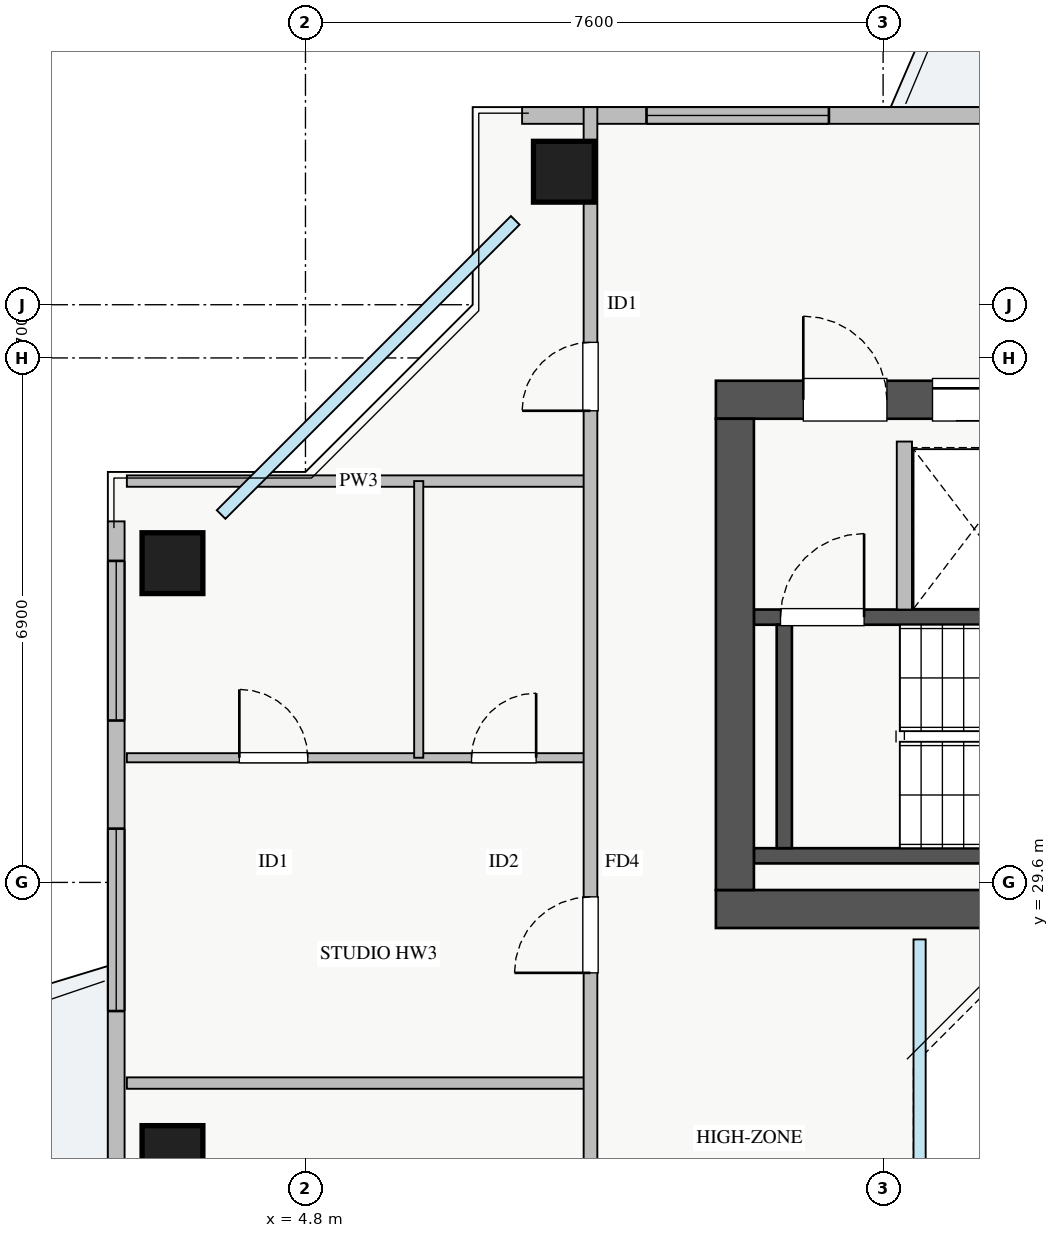
"""IFC4 building model, lengths in metres.
Left out: names, types, materials, properties, quantities, classifications, styles, units other than length and angle.
Written with IfcOpenShell. Run it as: python <this file> out.ifc"""

import sys

from ifc_helpers import new_model, si_unit, direction, frame, frame_2d, origin, origin_2d, place, context, subcontext, project, spatial, rectangle, extrude, source, transform, mapped, element, fill, save


model = new_model("IFC4")
c1 = context("Model", 3, precision=1e-05, world=origin(), true_north=direction((0.0, 1.0)))
c2 = subcontext(c1, "Body", "Model", "MODEL_VIEW")
j1 = project(units=[si_unit("LENGTHUNIT", "METRE"), si_unit("PLANEANGLEUNIT", "RADIAN")], contexts=[c1])
p1 = place(None, origin())
s1 = spatial("IfcSite", under=j1, at=p1, CompositionType="ELEMENT")
p2 = place(p1, origin())
s2 = spatial("IfcBuilding", under=s1, at=p2, CompositionType="ELEMENT")
p3 = place(p2, frame((0.0, 0.0, 206.75)))
s3 = spatial("IfcBuildingStorey", under=s2, at=p3, CompositionType="ELEMENT", Elevation=206.75)
p4 = place(p3, frame((12.68, 33.2, 0.0), z_axis=(0.0, 0.0, 1.0), x_axis=(1.0, 0.0, 0.0)))
e1 = element("IfcWall", 1, at=p4, inside=s3, PredefinedType="SHEAR", context=c2, shape_type="SweptSolid", body=[
    extrude(rectangle(XDim=1.94, YDim=0.18, at=frame_2d((0.97, 0.0))), origin(), (0.0, 0.0, 1.0), 3.07),
])
p5 = place(p3, frame((10.7, 29.95, 0.0), z_axis=(0.0, 0.0, 1.0), x_axis=(1.0, 0.0, 0.0)))
e2 = element("IfcWall", 2, at=p5, inside=s3, PredefinedType="SHEAR", context=c2, shape_type="SweptSolid", body=[
    extrude(rectangle(XDim=7.45, YDim=0.2, at=frame_2d((3.725, 0.0))), origin(), (0.0, 0.0, 1.0), 3.25),
])
p6 = place(p3, frame((10.7, 33.09, 0.0), z_axis=(0.0, 0.0, 1.0), x_axis=(1.0, 0.0, 0.0)))
e3 = element("IfcWall", 3, at=p6, inside=s3, PredefinedType="SHEAR", context=c2, shape_type="SweptSolid", body=[
    extrude(rectangle(XDim=7.45, YDim=0.2, at=frame_2d((3.725, 0.0))), origin(), (0.0, 0.0, 1.0), 3.25),
])
p7 = place(p6, frame((0.35, 0.0, 0.0)))
e4 = element("IfcOpeningElement", 4, at=p7, cuts=e3, PredefinedType="OPENING", context=c2, shape_type="SweptSolid", body=[
    extrude(rectangle(XDim=1.1, YDim=2.05, at=frame_2d((0.55, 1.025))), frame((0.0, 0.11, 0.0), z_axis=(0.0, -1.0, 0.0), x_axis=(1.0, 0.0, 0.0)), (0.0, 0.0, 1.0), 0.22),
])
p8 = place(p3, frame((11.1, 30.05, 0.0), z_axis=(0.0, 0.0, 1.0), x_axis=(0.0, 1.0, 0.0)))
e5 = element("IfcWall", 5, at=p8, inside=s3, PredefinedType="SHEAR", context=c2, shape_type="SweptSolid", body=[
    extrude(rectangle(XDim=2.94, YDim=0.2, at=frame_2d((1.47, 0.0))), origin(), (0.0, 0.0, 1.0), 3.25),
])
p9 = place(p3, frame((10.2, 29.25, 0.0), z_axis=(0.0, 0.0, 1.0), x_axis=(1.0, 0.0, 0.0)))
e6 = element("IfcWall", 6, at=p9, inside=s3, PredefinedType="SHEAR", context=c2, shape_type="SweptSolid", body=[
    extrude(rectangle(XDim=17.6, YDim=0.5, at=frame_2d((8.8, 0.0))), origin(), (0.0, 0.0, 1.0), 3.25),
])
p10 = place(p3, frame((10.2, 35.95, 0.0), z_axis=(0.0, 0.0, 1.0), x_axis=(1.0, 0.0, 0.0)))
e7 = element("IfcWall", 7, at=p10, inside=s3, PredefinedType="SHEAR", context=c2, shape_type="SweptSolid", body=[
    extrude(rectangle(XDim=17.6, YDim=0.5, at=frame_2d((8.8, 0.0))), origin(), (0.0, 0.0, 1.0), 3.25),
])
p11 = place(p10, frame((1.15, 0.0, 0.0)))
e8 = element("IfcOpeningElement", 8, at=p11, cuts=e7, PredefinedType="OPENING", context=c2, shape_type="SweptSolid", body=[
    extrude(rectangle(XDim=1.1, YDim=2.05, at=frame_2d((0.55, 1.025))), frame((0.0, 0.26, 0.0), z_axis=(0.0, -1.0, 0.0), x_axis=(1.0, 0.0, 0.0)), (0.0, 0.0, 1.0), 0.52),
])
p12 = place(p10, frame((8.3, 0.0, 0.0)))
e9 = element("IfcOpeningElement", 9, at=p12, cuts=e7, PredefinedType="OPENING", context=c2, shape_type="SweptSolid", body=[
    extrude(rectangle(XDim=1.1, YDim=2.05, at=frame_2d((0.55, 1.025))), frame((0.0, 0.26, 0.0), z_axis=(0.0, -1.0, 0.0), x_axis=(1.0, 0.0, 0.0)), (0.0, 0.0, 1.0), 0.52),
])
p13 = place(p10, frame((2.85, 0.0, 0.0)))
e10 = element("IfcOpeningElement", 10, at=p13, cuts=e7, PredefinedType="OPENING", context=c2, shape_type="SweptSolid", body=[
    extrude(rectangle(XDim=1.1, YDim=2.05, at=frame_2d((0.55, 1.025))), frame((0.0, 0.26, 0.0), z_axis=(0.0, -1.0, 0.0), x_axis=(1.0, 0.0, 0.0)), (0.0, 0.0, 1.0), 0.52),
])
p14 = place(p10, frame((5.8, 0.0, 0.0)))
e11 = element("IfcOpeningElement", 11, at=p14, cuts=e7, PredefinedType="OPENING", context=c2, shape_type="SweptSolid", body=[
    extrude(rectangle(XDim=1.0, YDim=2.05, at=frame_2d((0.5, 1.025))), frame((0.0, 0.26, 0.0), z_axis=(0.0, -1.0, 0.0), x_axis=(1.0, 0.0, 0.0)), (0.0, 0.0, 1.0), 0.52),
])
p15 = place(p10, frame((14.74, 0.0, 0.0)))
e12 = element("IfcOpeningElement", 12, at=p15, cuts=e7, PredefinedType="OPENING", context=c2, shape_type="SweptSolid", body=[
    extrude(rectangle(XDim=1.0, YDim=2.05, at=frame_2d((0.5, 1.025))), frame((0.0, 0.26, 0.0), z_axis=(0.0, -1.0, 0.0), x_axis=(1.0, 0.0, 0.0)), (0.0, 0.0, 1.0), 0.52),
])
p16 = place(p10, frame((10.175, 0.0, 0.0)))
e13 = element("IfcOpeningElement", 13, at=p16, cuts=e7, PredefinedType="OPENING", context=c2, shape_type="SweptSolid", body=[
    extrude(rectangle(XDim=1.0, YDim=2.05, at=frame_2d((0.5, 1.025))), frame((0.0, 0.26, 0.0), z_axis=(0.0, -1.0, 0.0), x_axis=(1.0, 0.0, 0.0)), (0.0, 0.0, 1.0), 0.52),
])
p17 = place(p10, frame((12.625, 0.0, 0.0)))
e14 = element("IfcOpeningElement", 14, at=p17, cuts=e7, PredefinedType="OPENING", context=c2, shape_type="SweptSolid", body=[
    extrude(rectangle(XDim=1.0, YDim=2.05, at=frame_2d((0.5, 1.025))), frame((0.0, 0.26, 0.0), z_axis=(0.0, -1.0, 0.0), x_axis=(1.0, 0.0, 0.0)), (0.0, 0.0, 1.0), 0.52),
])
p18 = place(p3, frame((10.45, 29.5, 0.0), z_axis=(0.0, 0.0, 1.0), x_axis=(0.0, 1.0, 0.0)))
e15 = element("IfcWall", 15, at=p18, inside=s3, PredefinedType="SHEAR", context=c2, shape_type="SweptSolid", body=[
    extrude(rectangle(XDim=6.2, YDim=0.5, at=frame_2d((3.1, 0.0))), origin(), (0.0, 0.0, 1.0), 3.25),
])
m1 = source(origin(), c2, "Body", "SweptSolid", [
    extrude(rectangle(XDim=0.8, YDim=0.8, at=origin_2d()), origin(), (0.0, 0.0, 1.0), 3.25),
])
for number, where, z_axis, x_axis in (
    (16, (8.2, 38.95, 0.0), (0.0, 0.0, 1.0), (1.0, 0.0, 0.0)),
    (17, (3.05, 33.8, 0.0), (0.0, 0.0, 1.0), (1.0, 0.0, 0.0)),
    (18, (3.05, 26.0, 0.0), (0.0, 0.0, 1.0), (1.0, 0.0, 0.0)),
):
    element("IfcColumn", number, at=place(p3, frame(where, z_axis=z_axis, x_axis=x_axis)), inside=s3, PredefinedType="COLUMN", context=c2, shape_type="MappedRepresentation", body=[
        mapped(m1, transform((0.0, 0.0, 0.0), x_axis=(1.0, 0.0, 0.0), y_axis=(0.0, 1.0, 0.0), z_axis=(0.0, 0.0, 1.0), scale=1.0)),
    ])
p19 = place(p3, frame((7.65, 39.69, 0.0), z_axis=(0.0, 0.0, 1.0), x_axis=(1.0, 0.0, 0.0)))
e19 = element("IfcWall", 19, at=p19, inside=s3, PredefinedType="STANDARD", context=c2, shape_type="SweptSolid", body=[
    extrude(rectangle(XDim=22.7, YDim=0.22, at=frame_2d((11.35, 0.0))), origin(), (0.0, 0.0, 1.0), 2.61),
])
p20 = place(p19, frame((12.2, 0.0, 0.0)))
e20 = element("IfcOpeningElement", 20, at=p20, cuts=e19, PredefinedType="OPENING", context=c2, shape_type="SweptSolid", body=[
    extrude(rectangle(XDim=1.2, YDim=2.1, at=frame_2d((0.6, 1.05))), frame((0.0, 0.12, 0.0), z_axis=(0.0, -1.0, 0.0), x_axis=(1.0, 0.0, 0.0)), (0.0, 0.0, 1.0), 0.24),
])
p21 = place(p19, frame((1.637, 0.0, 0.9)))
e21 = element("IfcOpeningElement", 21, at=p21, cuts=e19, PredefinedType="OPENING", context=c2, shape_type="SweptSolid", body=[
    extrude(rectangle(XDim=2.4, YDim=1.48, at=frame_2d((1.2, 0.74))), frame((0.0, 0.12, 0.0), z_axis=(0.0, -1.0, 0.0), x_axis=(1.0, 0.0, 0.0)), (0.0, 0.0, 1.0), 0.24),
])
p22 = place(p19, frame((7.612, 0.0, 0.9)))
e22 = element("IfcOpeningElement", 22, at=p22, cuts=e19, PredefinedType="OPENING", context=c2, shape_type="SweptSolid", body=[
    extrude(rectangle(XDim=1.8, YDim=1.45, at=frame_2d((0.9, 0.725))), frame((0.0, 0.12, 0.0), z_axis=(0.0, -1.0, 0.0), x_axis=(1.0, 0.0, 0.0)), (0.0, 0.0, 1.0), 0.24),
])
p23 = place(p19, frame((18.812, 0.0, 0.9)))
e23 = element("IfcOpeningElement", 23, at=p23, cuts=e19, PredefinedType="OPENING", context=c2, shape_type="SweptSolid", body=[
    extrude(rectangle(XDim=2.1, YDim=1.48, at=frame_2d((1.05, 0.74))), frame((0.0, 0.12, 0.0), z_axis=(0.0, -1.0, 0.0), x_axis=(1.0, 0.0, 0.0)), (0.0, 0.0, 1.0), 0.24),
])
p24 = place(p3, frame((2.31, 11.65, 0.0), z_axis=(0.0, 0.0, 1.0), x_axis=(0.0, 1.0, 0.0)))
e24 = element("IfcWall", 24, at=p24, inside=s3, PredefinedType="STANDARD", context=c2, shape_type="SweptSolid", body=[
    extrude(rectangle(XDim=22.7, YDim=0.22, at=frame_2d((11.35, 0.0))), origin(), (0.0, 0.0, 1.0), 2.61),
])
p25 = place(p24, frame((12.2, 0.0, 0.0)))
e25 = element("IfcOpeningElement", 25, at=p25, cuts=e24, PredefinedType="OPENING", context=c2, shape_type="SweptSolid", body=[
    extrude(rectangle(XDim=1.2, YDim=2.1, at=frame_2d((0.6, 1.05))), frame((0.0, 0.12, 0.0), z_axis=(0.0, -1.0, 0.0), x_axis=(1.0, 0.0, 0.0)), (0.0, 0.0, 1.0), 0.24),
])
p26 = place(p24, frame((0.8, 0.0, 0.9)))
e26 = element("IfcOpeningElement", 26, at=p26, cuts=e24, PredefinedType="OPENING", context=c2, shape_type="SweptSolid", body=[
    extrude(rectangle(XDim=2.4, YDim=1.5, at=frame_2d((1.2, 0.75))), frame((0.0, 0.12, 0.0), z_axis=(0.0, -1.0, 0.0), x_axis=(1.0, 0.0, 0.0)), (0.0, 0.0, 1.0), 0.24),
])
p27 = place(p24, frame((20.08, 0.0, 0.9)))
e27 = element("IfcOpeningElement", 27, at=p27, cuts=e24, PredefinedType="OPENING", context=c2, shape_type="SweptSolid", body=[
    extrude(rectangle(XDim=2.1, YDim=1.5, at=frame_2d((1.05, 0.75))), frame((0.0, 0.12, 0.0), z_axis=(0.0, -1.0, 0.0), x_axis=(1.0, 0.0, 0.0)), (0.0, 0.0, 1.0), 0.24),
])
p28 = place(p24, frame((16.258, 0.0, 0.9)))
e28 = element("IfcOpeningElement", 28, at=p28, cuts=e24, PredefinedType="OPENING", context=c2, shape_type="SweptSolid", body=[
    extrude(rectangle(XDim=2.4, YDim=1.5, at=frame_2d((1.2, 0.75))), frame((0.0, 0.12, 0.0), z_axis=(0.0, -1.0, 0.0), x_axis=(1.0, 0.0, 0.0)), (0.0, 0.0, 1.0), 0.24),
])
p29 = place(p3, frame((12.68, 33.19, 0.0), z_axis=(0.0, 0.0, 1.0), x_axis=(0.0, 1.0, 0.0)))
e29 = element("IfcWall", 29, at=p29, inside=s3, PredefinedType="PARTITIONING", context=c2, shape_type="SweptSolid", body=[
    extrude(rectangle(XDim=2.21, YDim=0.2, at=frame_2d((1.105, 0.0))), origin(), (0.0, 0.0, 1.0), 3.07),
])
p30 = place(p3, frame((2.45, 34.88, 0.0), z_axis=(0.0, 0.0, 1.0), x_axis=(1.0, 0.0, 0.0)))
e30 = element("IfcWall", 30, at=p30, inside=s3, PredefinedType="PARTITIONING", context=c2, shape_type="SweptSolid", body=[
    extrude(rectangle(XDim=6.1, YDim=0.15, at=frame_2d((3.05, 0.0))), origin(), (0.0, 0.0, 1.0), 3.07),
])
p31 = place(p3, frame((2.45, 31.24, 0.0), z_axis=(0.0, 0.0, 1.0), x_axis=(1.0, 0.0, 0.0)))
e31 = element("IfcWall", 31, at=p31, inside=s3, PredefinedType="PLUMBINGWALL", context=c2, shape_type="SweptSolid", body=[
    extrude(rectangle(XDim=6.1, YDim=0.12, at=frame_2d((3.05, 0.0))), origin(), (0.0, 0.0, 1.0), 3.07),
])
p32 = place(p31, frame((1.48, 0.0, 0.0)))
e32 = element("IfcOpeningElement", 32, at=p32, cuts=e31, PredefinedType="OPENING", context=c2, shape_type="SweptSolid", body=[
    extrude(rectangle(XDim=0.9, YDim=2.05, at=frame_2d((0.45, 1.025))), frame((0.0, 0.07, 0.0), z_axis=(0.0, -1.0, 0.0), x_axis=(1.0, 0.0, 0.0)), (0.0, 0.0, 1.0), 0.14),
])
p33 = place(p31, frame((4.535, 0.0, 0.0)))
e33 = element("IfcOpeningElement", 33, at=p33, cuts=e31, PredefinedType="OPENING", context=c2, shape_type="SweptSolid", body=[
    extrude(rectangle(XDim=0.85, YDim=2.05, at=frame_2d((0.425, 1.025))), frame((0.0, 0.07, 0.0), z_axis=(0.0, -1.0, 0.0), x_axis=(1.0, 0.0, 0.0)), (0.0, 0.0, 1.0), 0.14),
])
p34 = place(p3, frame((6.29, 31.24, 0.0), z_axis=(0.0, 0.0, 1.0), x_axis=(0.0, 1.0, 0.0)))
e34 = element("IfcWall", 34, at=p34, inside=s3, PredefinedType="PLUMBINGWALL", context=c2, shape_type="SweptSolid", body=[
    extrude(rectangle(XDim=3.64, YDim=0.12, at=frame_2d((1.82, 0.0))), origin(), (0.0, 0.0, 1.0), 3.07),
])
p35 = place(p3, frame((2.45, 26.96, 0.0), z_axis=(0.0, 0.0, 1.0), x_axis=(1.0, 0.0, 0.0)))
e35 = element("IfcWall", 35, at=p35, inside=s3, PredefinedType="PARTITIONING", context=c2, shape_type="SweptSolid", body=[
    extrude(rectangle(XDim=6.1, YDim=0.15, at=frame_2d((3.05, 0.0))), origin(), (0.0, 0.0, 1.0), 3.07),
])
p36 = place(p3, frame((8.55, 6.2, 0.0), z_axis=(0.0, 0.0, 1.0), x_axis=(0.0, 1.0, 0.0)))
e36 = element("IfcWall", 36, at=p36, inside=s3, PredefinedType="PARTITIONING", context=c2, shape_type="SweptSolid", body=[
    extrude(rectangle(XDim=33.6, YDim=0.18, at=frame_2d((16.8, 0.0))), origin(), (0.0, 0.0, 1.0), 3.07),
])
p37 = place(p36, frame((29.605, 0.0, 0.0)))
e37 = element("IfcOpeningElement", 37, at=p37, cuts=e36, PredefinedType="OPENING", context=c2, shape_type="SweptSolid", body=[
    extrude(rectangle(XDim=0.9, YDim=2.05, at=frame_2d((0.45, 1.025))), frame((0.0, 0.1, 0.0), z_axis=(0.0, -1.0, 0.0), x_axis=(1.0, 0.0, 0.0)), (0.0, 0.0, 1.0), 0.2),
])
p38 = place(p36, frame((2.92, 0.0, 0.0)))
e38 = element("IfcOpeningElement", 38, at=p38, cuts=e36, PredefinedType="OPENING", context=c2, shape_type="SweptSolid", body=[
    extrude(rectangle(XDim=0.9, YDim=2.05, at=frame_2d((0.45, 1.025))), frame((0.0, 0.1, 0.0), z_axis=(0.0, -1.0, 0.0), x_axis=(1.0, 0.0, 0.0)), (0.0, 0.0, 1.0), 0.2),
])
p39 = place(p36, frame((6.48, 0.0, 0.0)))
e39 = element("IfcOpeningElement", 39, at=p39, cuts=e36, PredefinedType="OPENING", context=c2, shape_type="SweptSolid", body=[
    extrude(rectangle(XDim=1.0, YDim=2.05, at=frame_2d((0.5, 1.025))), frame((0.0, 0.1, 0.0), z_axis=(0.0, -1.0, 0.0), x_axis=(1.0, 0.0, 0.0)), (0.0, 0.0, 1.0), 0.2),
])
p40 = place(p36, frame((16.51, 0.0, 0.0)))
e40 = element("IfcOpeningElement", 40, at=p40, cuts=e36, PredefinedType="OPENING", context=c2, shape_type="SweptSolid", body=[
    extrude(rectangle(XDim=1.0, YDim=2.05, at=frame_2d((0.5, 1.025))), frame((0.0, 0.1, 0.0), z_axis=(0.0, -1.0, 0.0), x_axis=(1.0, 0.0, 0.0)), (0.0, 0.0, 1.0), 0.2),
])
p41 = place(p36, frame((22.21, 0.0, 0.0)))
e41 = element("IfcOpeningElement", 41, at=p41, cuts=e36, PredefinedType="OPENING", context=c2, shape_type="SweptSolid", body=[
    extrude(rectangle(XDim=1.0, YDim=2.05, at=frame_2d((0.5, 1.025))), frame((0.0, 0.1, 0.0), z_axis=(0.0, -1.0, 0.0), x_axis=(1.0, 0.0, 0.0)), (0.0, 0.0, 1.0), 0.2),
])
m2 = source(origin(), c2, "Body", "SweptSolid", [
    extrude(rectangle(XDim=2.4, YDim=1.48, at=frame_2d((1.2, 0.74))), frame((0.0, 0.03, 0.0), z_axis=(0.0, -1.0, 0.0), x_axis=(1.0, 0.0, 0.0)), (0.0, 0.0, 1.0), 0.06),
])
p42 = place(p21, origin())
e42 = element("IfcWindow", 42, at=p42, inside=s3, PartitioningType="TRIPLE_PANEL_VERTICAL", PredefinedType="WINDOW", context=c2, shape_type="MappedRepresentation", body=[
    mapped(m2, transform((0.0, 0.0, 0.0), x_axis=(1.0, 0.0, 0.0), y_axis=(0.0, 1.0, 0.0), z_axis=(0.0, 0.0, 1.0), scale=1.0)),
])
fill(e21, e42)
m3 = source(origin(), c2, "Body", "SweptSolid", [
    extrude(rectangle(XDim=2.1, YDim=1.5, at=frame_2d((1.05, 0.75))), frame((0.0, 0.03, 0.0), z_axis=(0.0, -1.0, 0.0), x_axis=(1.0, 0.0, 0.0)), (0.0, 0.0, 1.0), 0.06),
])
p43 = place(p27, origin())
e43 = element("IfcWindow", 43, at=p43, inside=s3, PartitioningType="TRIPLE_PANEL_VERTICAL", PredefinedType="WINDOW", context=c2, shape_type="MappedRepresentation", body=[
    mapped(m3, transform((0.0, 0.0, 0.0), x_axis=(1.0, 0.0, 0.0), y_axis=(0.0, 1.0, 0.0), z_axis=(0.0, 0.0, 1.0), scale=1.0)),
])
fill(e27, e43)
m4 = source(origin(), c2, "Body", "SweptSolid", [
    extrude(rectangle(XDim=1.1, YDim=2.05, at=frame_2d((0.55, 1.025))), frame((0.0, 0.025, 0.0), z_axis=(0.0, -1.0, 0.0), x_axis=(1.0, 0.0, 0.0)), (0.0, 0.0, 1.0), 0.05),
])
p44 = place(p11, origin())
e44 = element("IfcDoor", 44, at=p44, inside=s3, OperationType="SINGLE_SWING_LEFT", PredefinedType="DOOR", context=c2, shape_type="MappedRepresentation", body=[
    mapped(m4, transform((0.0, 0.0, 0.0), x_axis=(1.0, 0.0, 0.0), y_axis=(0.0, 1.0, 0.0), z_axis=(0.0, 0.0, 1.0), scale=1.0)),
])
fill(e8, e44)
p45 = place(p7, origin())
e45 = element("IfcDoor", 45, at=p45, inside=s3, OperationType="SINGLE_SWING_RIGHT", PredefinedType="DOOR", context=c2, shape_type="MappedRepresentation", body=[
    mapped(m4, transform((0.0, 0.0, 0.0), x_axis=(1.0, 0.0, 0.0), y_axis=(0.0, 1.0, 0.0), z_axis=(0.0, 0.0, 1.0), scale=1.0)),
])
fill(e4, e45)
p46 = place(p13, origin())
e46 = element("IfcDoor", 46, at=p46, inside=s3, OperationType="SLIDING_TO_LEFT", PredefinedType="DOOR", context=c2, shape_type="MappedRepresentation", body=[
    mapped(m4, transform((0.0, 0.0, 0.0), x_axis=(1.0, 0.0, 0.0), y_axis=(0.0, 1.0, 0.0), z_axis=(0.0, 0.0, 1.0), scale=1.0)),
])
fill(e10, e46)
m5 = source(origin(), c2, "Body", "SweptSolid", [
    extrude(rectangle(XDim=0.9, YDim=2.05, at=frame_2d((0.45, 1.025))), frame((0.0, 0.025, 0.0), z_axis=(0.0, -1.0, 0.0), x_axis=(1.0, 0.0, 0.0)), (0.0, 0.0, 1.0), 0.05),
])
p47 = place(p32, origin())
e47 = element("IfcDoor", 47, at=p47, inside=s3, OperationType="SINGLE_SWING_LEFT", PredefinedType="DOOR", context=c2, shape_type="MappedRepresentation", body=[
    mapped(m5, transform((0.0, 0.0, 0.0), x_axis=(1.0, 0.0, 0.0), y_axis=(0.0, 1.0, 0.0), z_axis=(0.0, 0.0, 1.0), scale=1.0)),
])
fill(e32, e47)
m6 = source(origin(), c2, "Body", "SweptSolid", [
    extrude(rectangle(XDim=0.85, YDim=2.05, at=frame_2d((0.425, 1.025))), frame((0.0, 0.025, 0.0), z_axis=(0.0, -1.0, 0.0), x_axis=(1.0, 0.0, 0.0)), (0.0, 0.0, 1.0), 0.05),
])
p48 = place(p33, origin())
e48 = element("IfcDoor", 48, at=p48, inside=s3, OperationType="SINGLE_SWING_RIGHT", PredefinedType="DOOR", context=c2, shape_type="MappedRepresentation", body=[
    mapped(m6, transform((0.0, 0.0, 0.0), x_axis=(1.0, 0.0, 0.0), y_axis=(0.0, 1.0, 0.0), z_axis=(0.0, 0.0, 1.0), scale=1.0)),
])
fill(e33, e48)
p49 = place(p37, origin())
e49 = element("IfcDoor", 49, at=p49, inside=s3, OperationType="SINGLE_SWING_LEFT", PredefinedType="DOOR", context=c2, shape_type="MappedRepresentation", body=[
    mapped(m5, transform((0.0, 0.0, 0.0), x_axis=(1.0, 0.0, 0.0), y_axis=(0.0, 1.0, 0.0), z_axis=(0.0, 0.0, 1.0), scale=1.0)),
])
fill(e37, e49)
m7 = source(origin(), c2, "Body", "SweptSolid", [
    extrude(rectangle(XDim=1.0, YDim=2.05, at=frame_2d((0.5, 1.025))), frame((0.0, 0.025, 0.0), z_axis=(0.0, -1.0, 0.0), x_axis=(1.0, 0.0, 0.0)), (0.0, 0.0, 1.0), 0.05),
])
p50 = place(p41, origin())
e50 = element("IfcDoor", 50, at=p50, inside=s3, OperationType="SINGLE_SWING_LEFT", PredefinedType="DOOR", context=c2, shape_type="MappedRepresentation", body=[
    mapped(m7, transform((0.0, 0.0, 0.0), x_axis=(1.0, 0.0, 0.0), y_axis=(0.0, 1.0, 0.0), z_axis=(0.0, 0.0, 1.0), scale=1.0)),
])
fill(e41, e50)
m8 = source(origin(), c2, "Body", "SweptSolid", [
    extrude(rectangle(XDim=2.4, YDim=1.5, at=frame_2d((1.2, 0.75))), frame((0.0, 0.03, 0.0), z_axis=(0.0, -1.0, 0.0), x_axis=(1.0, 0.0, 0.0)), (0.0, 0.0, 1.0), 0.06),
])
p51 = place(p28, origin())
e51 = element("IfcWindow", 51, at=p51, inside=s3, PartitioningType="TRIPLE_PANEL_VERTICAL", PredefinedType="WINDOW", context=c2, shape_type="MappedRepresentation", body=[
    mapped(m8, transform((0.0, 0.0, 0.0), x_axis=(1.0, 0.0, 0.0), y_axis=(0.0, 1.0, 0.0), z_axis=(0.0, 0.0, 1.0), scale=1.0)),
])
fill(e28, e51)
save(model, sys.argv[1])
